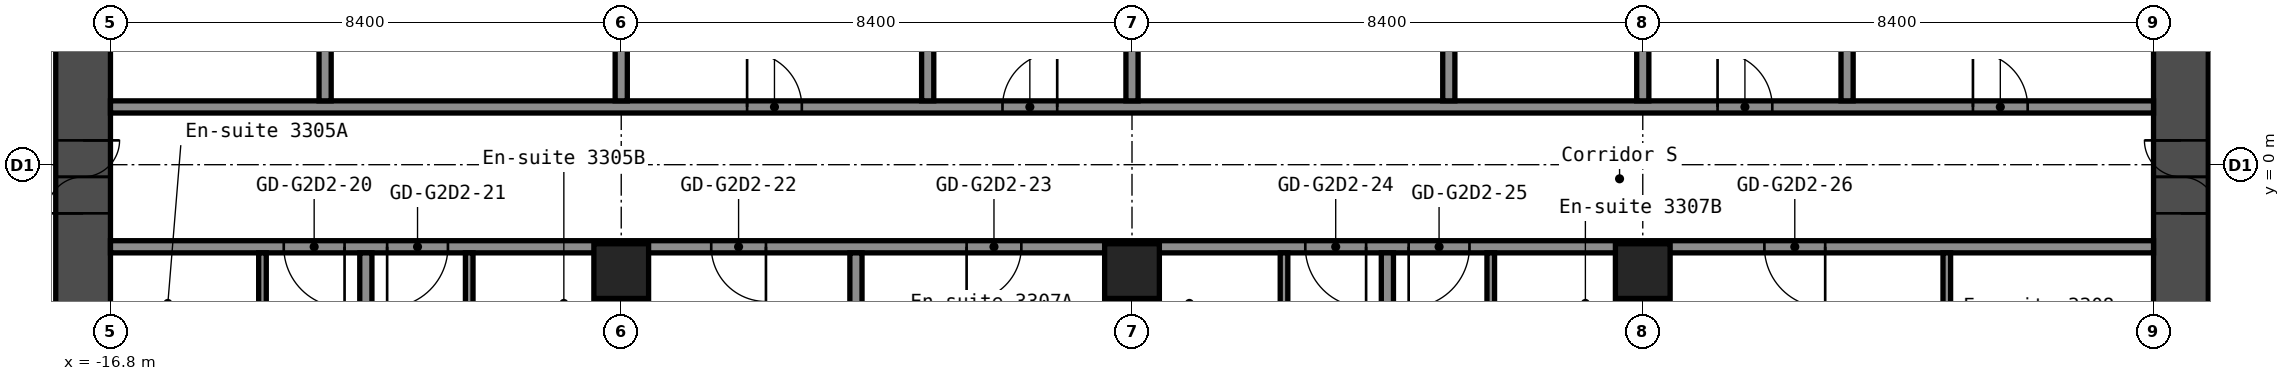
"""IFC4 building model, lengths in metres.
Left out: names, types, materials, properties, quantities, classifications, styles, units other than length and angle.
Written with IfcOpenShell. Run it as: python <this file> out.ifc"""

import sys

from ifc_helpers import new_model, si_unit, direction, frame, frame_2d, origin, origin_2d, place, context, subcontext, project, spatial, rectangle, hollow_rectangle, extrude, element, fill, save


model = new_model("IFC4")
c1 = context("Model", 3, precision=1e-05, world=origin(), true_north=direction((0.0, 1.0)))
c2 = subcontext(c1, "Body", "Model", "MODEL_VIEW")
j1 = project(units=[si_unit("LENGTHUNIT", "METRE"), si_unit("PLANEANGLEUNIT", "RADIAN")], contexts=[c1])
p1 = place(None, origin())
s1 = spatial("IfcSite", under=j1, at=p1, CompositionType="ELEMENT")
p2 = place(p1, origin())
s2 = spatial("IfcBuilding", under=s1, at=p2, CompositionType="ELEMENT")
p3 = place(p2, frame((0.0, 0.0, 117.0)))
s3 = spatial("IfcBuildingStorey", under=s2, at=p3, CompositionType="ELEMENT", Elevation=117.0)
for number, where, z_axis, x_axis in (
    (1, (-8.4, -1.75, 0.0), (0.0, 0.0, 1.0), (1.0, 0.0, 0.0)),
    (2, (0.0, -1.75, 0.0), (0.0, 0.0, 1.0), (1.0, 0.0, 0.0)),
    (3, (8.4, -1.75, 0.0), (0.0, 0.0, 1.0), (1.0, 0.0, 0.0)),
):
    element("IfcColumn", number, at=place(p3, frame(where, z_axis=z_axis, x_axis=x_axis)), inside=s3, PredefinedType="COLUMN", context=c2, shape_type="SweptSolid", body=[
        extrude(hollow_rectangle(XDim=0.9, YDim=0.9, WallThickness=0.036, at=origin_2d()), origin(), (0.0, 0.0, 1.0), 2.9),
    ])
p4 = place(p3, frame((-17.25, -8.4, 0.0), z_axis=(0.0, 0.0, 1.0), x_axis=(0.0, 1.0, 0.0)))
e4 = element("IfcWall", 4, at=p4, inside=s3, PredefinedType="SHEAR", context=c2, shape_type="SweptSolid", body=[
    extrude(rectangle(XDim=16.8, YDim=0.9, at=frame_2d((8.4, 0.0))), origin(), (0.0, 0.0, 1.0), 2.9),
])
p5 = place(p4, frame((7.6, 0.0, 0.0)))
e5 = element("IfcOpeningElement", 5, at=p5, cuts=e4, PredefinedType="OPENING", context=c2, shape_type="SweptSolid", body=[
    extrude(rectangle(XDim=1.2, YDim=2.1, at=frame_2d((0.6, 1.05))), frame((0.0, 0.46, 0.0), z_axis=(0.0, -1.0, 0.0), x_axis=(1.0, 0.0, 0.0)), (0.0, 0.0, 1.0), 0.92),
])
p6 = place(p3, frame((17.25, -8.4, 0.0), z_axis=(0.0, 0.0, 1.0), x_axis=(0.0, 1.0, 0.0)))
e6 = element("IfcWall", 6, at=p6, inside=s3, PredefinedType="SHEAR", context=c2, shape_type="SweptSolid", body=[
    extrude(rectangle(XDim=16.8, YDim=0.9, at=frame_2d((8.4, 0.0))), origin(), (0.0, 0.0, 1.0), 2.9),
])
p7 = place(p6, frame((7.6, 0.0, 0.0)))
e7 = element("IfcOpeningElement", 7, at=p7, cuts=e6, PredefinedType="OPENING", context=c2, shape_type="SweptSolid", body=[
    extrude(rectangle(XDim=1.2, YDim=2.1, at=frame_2d((0.6, 1.05))), frame((0.0, 0.46, 0.0), z_axis=(0.0, -1.0, 0.0), x_axis=(1.0, 0.0, 0.0)), (0.0, 0.0, 1.0), 0.92),
])
p8 = place(p3, frame((-16.8, -1.35, 0.0), z_axis=(0.0, 0.0, 1.0), x_axis=(1.0, 0.0, 0.0)))
e8 = element("IfcWall", 8, at=p8, inside=s3, PredefinedType="PARTITIONING", context=c2, shape_type="SweptSolid", body=[
    extrude(rectangle(XDim=33.6, YDim=0.2, at=frame_2d((16.8, 0.0))), origin(), (0.0, 0.0, 1.0), 2.9),
])
p9 = place(p8, frame((2.85, 0.0, 0.0)))
e9 = element("IfcOpeningElement", 9, at=p9, cuts=e8, PredefinedType="OPENING", context=c2, shape_type="SweptSolid", body=[
    extrude(rectangle(XDim=1.0, YDim=2.1, at=frame_2d((0.5, 1.05))), frame((0.0, 0.11, 0.0), z_axis=(0.0, -1.0, 0.0), x_axis=(1.0, 0.0, 0.0)), (0.0, 0.0, 1.0), 0.22),
])
p10 = place(p8, frame((4.55, 0.0, 0.0)))
e10 = element("IfcOpeningElement", 10, at=p10, cuts=e8, PredefinedType="OPENING", context=c2, shape_type="SweptSolid", body=[
    extrude(rectangle(XDim=1.0, YDim=2.1, at=frame_2d((0.5, 1.05))), frame((0.0, 0.11, 0.0), z_axis=(0.0, -1.0, 0.0), x_axis=(1.0, 0.0, 0.0)), (0.0, 0.0, 1.0), 0.22),
])
p11 = place(p8, frame((9.88, 0.0, 0.0)))
e11 = element("IfcOpeningElement", 11, at=p11, cuts=e8, PredefinedType="OPENING", context=c2, shape_type="SweptSolid", body=[
    extrude(rectangle(XDim=0.9, YDim=2.1, at=frame_2d((0.45, 1.05))), frame((0.0, 0.11, 0.0), z_axis=(0.0, -1.0, 0.0), x_axis=(1.0, 0.0, 0.0)), (0.0, 0.0, 1.0), 0.22),
])
p12 = place(p8, frame((14.08, 0.0, 0.0)))
e12 = element("IfcOpeningElement", 12, at=p12, cuts=e8, PredefinedType="OPENING", context=c2, shape_type="SweptSolid", body=[
    extrude(rectangle(XDim=0.9, YDim=2.1, at=frame_2d((0.45, 1.05))), frame((0.0, 0.11, 0.0), z_axis=(0.0, -1.0, 0.0), x_axis=(1.0, 0.0, 0.0)), (0.0, 0.0, 1.0), 0.22),
])
p13 = place(p8, frame((19.65, 0.0, 0.0)))
e13 = element("IfcOpeningElement", 13, at=p13, cuts=e8, PredefinedType="OPENING", context=c2, shape_type="SweptSolid", body=[
    extrude(rectangle(XDim=1.0, YDim=2.1, at=frame_2d((0.5, 1.05))), frame((0.0, 0.11, 0.0), z_axis=(0.0, -1.0, 0.0), x_axis=(1.0, 0.0, 0.0)), (0.0, 0.0, 1.0), 0.22),
])
p14 = place(p8, frame((21.35, 0.0, 0.0)))
e14 = element("IfcOpeningElement", 14, at=p14, cuts=e8, PredefinedType="OPENING", context=c2, shape_type="SweptSolid", body=[
    extrude(rectangle(XDim=1.0, YDim=2.1, at=frame_2d((0.5, 1.05))), frame((0.0, 0.11, 0.0), z_axis=(0.0, -1.0, 0.0), x_axis=(1.0, 0.0, 0.0)), (0.0, 0.0, 1.0), 0.22),
])
p15 = place(p8, frame((27.2, 0.0, 0.0)))
e15 = element("IfcOpeningElement", 15, at=p15, cuts=e8, PredefinedType="OPENING", context=c2, shape_type="SweptSolid", body=[
    extrude(rectangle(XDim=1.0, YDim=2.1, at=frame_2d((0.5, 1.05))), frame((0.0, 0.11, 0.0), z_axis=(0.0, -1.0, 0.0), x_axis=(1.0, 0.0, 0.0)), (0.0, 0.0, 1.0), 0.22),
])
p16 = place(p3, frame((-16.8, 0.95, 0.0), z_axis=(0.0, 0.0, 1.0), x_axis=(1.0, 0.0, 0.0)))
e16 = element("IfcWall", 16, at=p16, inside=s3, PredefinedType="PARTITIONING", context=c2, shape_type="SweptSolid", body=[
    extrude(rectangle(XDim=33.6, YDim=0.2, at=frame_2d((16.8, 0.0))), origin(), (0.0, 0.0, 1.0), 2.9),
])
p17 = place(p16, frame((10.47, 0.0, 0.0)))
e17 = element("IfcOpeningElement", 17, at=p17, cuts=e16, PredefinedType="OPENING", context=c2, shape_type="SweptSolid", body=[
    extrude(rectangle(XDim=0.9, YDim=2.1, at=frame_2d((0.45, 1.05))), frame((0.0, 0.11, 0.0), z_axis=(0.0, -1.0, 0.0), x_axis=(1.0, 0.0, 0.0)), (0.0, 0.0, 1.0), 0.22),
])
p18 = place(p16, frame((14.67, 0.0, 0.0)))
e18 = element("IfcOpeningElement", 18, at=p18, cuts=e16, PredefinedType="OPENING", context=c2, shape_type="SweptSolid", body=[
    extrude(rectangle(XDim=0.9, YDim=2.1, at=frame_2d((0.45, 1.05))), frame((0.0, 0.11, 0.0), z_axis=(0.0, -1.0, 0.0), x_axis=(1.0, 0.0, 0.0)), (0.0, 0.0, 1.0), 0.22),
])
p19 = place(p16, frame((26.43, 0.0, 0.0)))
e19 = element("IfcOpeningElement", 19, at=p19, cuts=e16, PredefinedType="OPENING", context=c2, shape_type="SweptSolid", body=[
    extrude(rectangle(XDim=0.9, YDim=2.1, at=frame_2d((0.45, 1.05))), frame((0.0, 0.11, 0.0), z_axis=(0.0, -1.0, 0.0), x_axis=(1.0, 0.0, 0.0)), (0.0, 0.0, 1.0), 0.22),
])
p20 = place(p16, frame((30.63, 0.0, 0.0)))
e20 = element("IfcOpeningElement", 20, at=p20, cuts=e16, PredefinedType="OPENING", context=c2, shape_type="SweptSolid", body=[
    extrude(rectangle(XDim=0.9, YDim=2.1, at=frame_2d((0.45, 1.05))), frame((0.0, 0.11, 0.0), z_axis=(0.0, -1.0, 0.0), x_axis=(1.0, 0.0, 0.0)), (0.0, 0.0, 1.0), 0.22),
])
p21 = place(p3, frame((-14.3, -4.35, 0.0), z_axis=(0.0, 0.0, 1.0), x_axis=(0.0, 1.0, 0.0)))
e21 = element("IfcWall", 21, at=p21, inside=s3, PredefinedType="PARTITIONING", context=c2, shape_type="SweptSolid", body=[
    extrude(rectangle(XDim=2.9, YDim=0.125, at=frame_2d((1.45, 0.0))), origin(), (0.0, 0.0, 1.0), 2.9),
])
p22 = place(p21, frame((0.6, 0.0, 0.0)))
e22 = element("IfcOpeningElement", 22, at=p22, cuts=e21, PredefinedType="OPENING", context=c2, shape_type="SweptSolid", body=[
    extrude(rectangle(XDim=0.8, YDim=2.1, at=frame_2d((0.4, 1.05))), frame((0.0, 0.073, 0.0), z_axis=(0.0, -1.0, 0.0), x_axis=(1.0, 0.0, 0.0)), (0.0, 0.0, 1.0), 0.145),
])
p23 = place(p3, frame((-13.27, 1.05, 0.0), z_axis=(0.0, 0.0, 1.0), x_axis=(0.0, 1.0, 0.0)))
e23 = element("IfcWall", 23, at=p23, inside=s3, PredefinedType="PARTITIONING", context=c2, shape_type="SweptSolid", body=[
    extrude(rectangle(XDim=5.9, YDim=0.2, at=frame_2d((2.95, 0.0))), origin(), (0.0, 0.0, 1.0), 2.9),
])
p24 = place(p3, frame((-12.6, -15.55, 0.0), z_axis=(0.0, 0.0, 1.0), x_axis=(0.0, 1.0, 0.0)))
e24 = element("IfcWall", 24, at=p24, inside=s3, PredefinedType="PARTITIONING", context=c2, shape_type="SweptSolid", body=[
    extrude(rectangle(XDim=14.1, YDim=0.2, at=frame_2d((7.05, 0.0))), origin(), (0.0, 0.0, 1.0), 2.9),
])
p25 = place(p3, frame((-10.9, -4.35, 0.0), z_axis=(0.0, 0.0, 1.0), x_axis=(0.0, 1.0, 0.0)))
e25 = element("IfcWall", 25, at=p25, inside=s3, PredefinedType="PARTITIONING", context=c2, shape_type="SweptSolid", body=[
    extrude(rectangle(XDim=2.9, YDim=0.125, at=frame_2d((1.45, 0.0))), origin(), (0.0, 0.0, 1.0), 2.9),
])
p26 = place(p25, frame((0.6, 0.0, 0.0)))
e26 = element("IfcOpeningElement", 26, at=p26, cuts=e25, PredefinedType="OPENING", context=c2, shape_type="SweptSolid", body=[
    extrude(rectangle(XDim=0.8, YDim=2.1, at=frame_2d((0.4, 1.05))), frame((0.0, 0.073, 0.0), z_axis=(0.0, -1.0, 0.0), x_axis=(1.0, 0.0, 0.0)), (0.0, 0.0, 1.0), 0.145),
])
p27 = place(p3, frame((-8.4, -15.55, 0.0), z_axis=(0.0, 0.0, 1.0), x_axis=(0.0, 1.0, 0.0)))
e27 = element("IfcWall", 27, at=p27, inside=s3, PredefinedType="PARTITIONING", context=c2, shape_type="SweptSolid", body=[
    extrude(rectangle(XDim=13.36, YDim=0.2, at=frame_2d((6.68, 0.0))), origin(), (0.0, 0.0, 1.0), 2.9),
])
p28 = place(p3, frame((-8.4, 1.05, 0.0), z_axis=(0.0, 0.0, 1.0), x_axis=(0.0, 1.0, 0.0)))
e28 = element("IfcWall", 28, at=p28, inside=s3, PredefinedType="PARTITIONING", context=c2, shape_type="SweptSolid", body=[
    extrude(rectangle(XDim=5.9, YDim=0.2, at=frame_2d((2.95, 0.0))), origin(), (0.0, 0.0, 1.0), 2.9),
])
p29 = place(p3, frame((-4.54, -15.55, 0.0), z_axis=(0.0, 0.0, 1.0), x_axis=(0.0, 1.0, 0.0)))
e29 = element("IfcWall", 29, at=p29, inside=s3, PredefinedType="PARTITIONING", context=c2, shape_type="SweptSolid", body=[
    extrude(rectangle(XDim=14.1, YDim=0.2, at=frame_2d((7.05, 0.0))), origin(), (0.0, 0.0, 1.0), 2.9),
])
p30 = place(p3, frame((-3.36, 1.05, 0.0), z_axis=(0.0, 0.0, 1.0), x_axis=(0.0, 1.0, 0.0)))
e30 = element("IfcWall", 30, at=p30, inside=s3, PredefinedType="PARTITIONING", context=c2, shape_type="SweptSolid", body=[
    extrude(rectangle(XDim=5.9, YDim=0.2, at=frame_2d((2.95, 0.0))), origin(), (0.0, 0.0, 1.0), 2.9),
])
p31 = place(p3, frame((0.0, -15.55, 0.0), z_axis=(0.0, 0.0, 1.0), x_axis=(0.0, 1.0, 0.0)))
e31 = element("IfcWall", 31, at=p31, inside=s3, PredefinedType="PARTITIONING", context=c2, shape_type="SweptSolid", body=[
    extrude(rectangle(XDim=13.36, YDim=0.2, at=frame_2d((6.68, 0.0))), origin(), (0.0, 0.0, 1.0), 2.9),
])
p32 = place(p3, frame((0.0, 1.05, 0.0), z_axis=(0.0, 0.0, 1.0), x_axis=(0.0, 1.0, 0.0)))
e32 = element("IfcWall", 32, at=p32, inside=s3, PredefinedType="PARTITIONING", context=c2, shape_type="SweptSolid", body=[
    extrude(rectangle(XDim=5.9, YDim=0.2, at=frame_2d((2.95, 0.0))), origin(), (0.0, 0.0, 1.0), 2.9),
])
p33 = place(p3, frame((2.5, -4.35, 0.0), z_axis=(0.0, 0.0, 1.0), x_axis=(0.0, 1.0, 0.0)))
e33 = element("IfcWall", 33, at=p33, inside=s3, PredefinedType="PARTITIONING", context=c2, shape_type="SweptSolid", body=[
    extrude(rectangle(XDim=2.9, YDim=0.125, at=frame_2d((1.45, 0.0))), origin(), (0.0, 0.0, 1.0), 2.9),
])
p34 = place(p33, frame((0.6, 0.0, 0.0)))
e34 = element("IfcOpeningElement", 34, at=p34, cuts=e33, PredefinedType="OPENING", context=c2, shape_type="SweptSolid", body=[
    extrude(rectangle(XDim=0.8, YDim=2.1, at=frame_2d((0.4, 1.05))), frame((0.0, 0.073, 0.0), z_axis=(0.0, -1.0, 0.0), x_axis=(1.0, 0.0, 0.0)), (0.0, 0.0, 1.0), 0.145),
])
p35 = place(p3, frame((4.2, -15.55, 0.0), z_axis=(0.0, 0.0, 1.0), x_axis=(0.0, 1.0, 0.0)))
e35 = element("IfcWall", 35, at=p35, inside=s3, PredefinedType="PARTITIONING", context=c2, shape_type="SweptSolid", body=[
    extrude(rectangle(XDim=14.1, YDim=0.2, at=frame_2d((7.05, 0.0))), origin(), (0.0, 0.0, 1.0), 2.9),
])
p36 = place(p3, frame((5.21, 1.05, 0.0), z_axis=(0.0, 0.0, 1.0), x_axis=(0.0, 1.0, 0.0)))
e36 = element("IfcWall", 36, at=p36, inside=s3, PredefinedType="PARTITIONING", context=c2, shape_type="SweptSolid", body=[
    extrude(rectangle(XDim=5.9, YDim=0.2, at=frame_2d((2.95, 0.0))), origin(), (0.0, 0.0, 1.0), 2.9),
])
p37 = place(p3, frame((5.9, -4.35, 0.0), z_axis=(0.0, 0.0, 1.0), x_axis=(0.0, 1.0, 0.0)))
e37 = element("IfcWall", 37, at=p37, inside=s3, PredefinedType="PARTITIONING", context=c2, shape_type="SweptSolid", body=[
    extrude(rectangle(XDim=2.9, YDim=0.125, at=frame_2d((1.45, 0.0))), origin(), (0.0, 0.0, 1.0), 2.9),
])
p38 = place(p37, frame((0.6, 0.0, 0.0)))
e38 = element("IfcOpeningElement", 38, at=p38, cuts=e37, PredefinedType="OPENING", context=c2, shape_type="SweptSolid", body=[
    extrude(rectangle(XDim=0.8, YDim=2.1, at=frame_2d((0.4, 1.05))), frame((0.0, 0.073, 0.0), z_axis=(0.0, -1.0, 0.0), x_axis=(1.0, 0.0, 0.0)), (0.0, 0.0, 1.0), 0.145),
])
p39 = place(p3, frame((8.4, -15.55, 0.0), z_axis=(0.0, 0.0, 1.0), x_axis=(0.0, 1.0, 0.0)))
e39 = element("IfcWall", 39, at=p39, inside=s3, PredefinedType="PARTITIONING", context=c2, shape_type="SweptSolid", body=[
    extrude(rectangle(XDim=13.36, YDim=0.2, at=frame_2d((6.68, 0.0))), origin(), (0.0, 0.0, 1.0), 2.9),
])
for number, where, z_axis, x_axis in (
    (40, (8.4, 1.05, 0.0), (0.0, 0.0, 1.0), (0.0, 1.0, 0.0)),
    (41, (11.76, 1.05, 0.0), (0.0, 0.0, 1.0), (0.0, 1.0, 0.0)),
):
    element("IfcWall", number, at=place(p3, frame(where, z_axis=z_axis, x_axis=x_axis)), inside=s3, PredefinedType="PARTITIONING", context=c2, shape_type="SweptSolid", body=[
        extrude(rectangle(XDim=5.9, YDim=0.2, at=frame_2d((2.95, 0.0))), origin(), (0.0, 0.0, 1.0), 2.9),
    ])
p40 = place(p3, frame((13.4, -4.75, 0.0), z_axis=(0.0, 0.0, 1.0), x_axis=(0.0, 1.0, 0.0)))
e42 = element("IfcWall", 42, at=p40, inside=s3, PredefinedType="PARTITIONING", context=c2, shape_type="SweptSolid", body=[
    extrude(rectangle(XDim=3.3, YDim=0.125, at=frame_2d((1.65, 0.0))), origin(), (0.0, 0.0, 1.0), 2.9),
])
p41 = place(p5, origin())
e43 = element("IfcDoor", 43, at=p41, inside=s3, OperationType="DOUBLE_DOOR_SINGLE_SWING", PredefinedType="DOOR", context=c2, shape_type="SweptSolid", body=[
    extrude(rectangle(XDim=1.2, YDim=2.1, at=frame_2d((0.6, 1.05))), frame((0.0, 0.025, 0.0), z_axis=(0.0, -1.0, 0.0), x_axis=(1.0, 0.0, 0.0)), (0.0, 0.0, 1.0), 0.05),
])
fill(e5, e43)
p42 = place(p7, origin())
e44 = element("IfcDoor", 44, at=p42, inside=s3, OperationType="DOUBLE_DOOR_SINGLE_SWING", PredefinedType="DOOR", context=c2, shape_type="SweptSolid", body=[
    extrude(rectangle(XDim=1.2, YDim=2.1, at=frame_2d((0.6, 1.05))), frame((0.0, 0.025, 0.0), z_axis=(0.0, -1.0, 0.0), x_axis=(1.0, 0.0, 0.0)), (0.0, 0.0, 1.0), 0.05),
])
fill(e7, e44)
p43 = place(p9, origin())
e45 = element("IfcDoor", 45, at=p43, inside=s3, OperationType="SINGLE_SWING_RIGHT", PredefinedType="DOOR", context=c2, shape_type="SweptSolid", body=[
    extrude(rectangle(XDim=1.0, YDim=2.1, at=frame_2d((0.5, 1.05))), frame((0.0, 0.025, 0.0), z_axis=(0.0, -1.0, 0.0), x_axis=(1.0, 0.0, 0.0)), (0.0, 0.0, 1.0), 0.05),
])
fill(e9, e45)
p44 = place(p10, origin())
e46 = element("IfcDoor", 46, at=p44, inside=s3, OperationType="SINGLE_SWING_LEFT", PredefinedType="DOOR", context=c2, shape_type="SweptSolid", body=[
    extrude(rectangle(XDim=1.0, YDim=2.1, at=frame_2d((0.5, 1.05))), frame((0.0, 0.025, 0.0), z_axis=(0.0, -1.0, 0.0), x_axis=(1.0, 0.0, 0.0)), (0.0, 0.0, 1.0), 0.05),
])
fill(e10, e46)
p45 = place(p11, origin())
e47 = element("IfcDoor", 47, at=p45, inside=s3, OperationType="SINGLE_SWING_RIGHT", PredefinedType="DOOR", context=c2, shape_type="SweptSolid", body=[
    extrude(rectangle(XDim=0.9, YDim=2.1, at=frame_2d((0.45, 1.05))), frame((0.0, 0.025, 0.0), z_axis=(0.0, -1.0, 0.0), x_axis=(1.0, 0.0, 0.0)), (0.0, 0.0, 1.0), 0.05),
])
fill(e11, e47)
p46 = place(p12, origin())
e48 = element("IfcDoor", 48, at=p46, inside=s3, OperationType="SINGLE_SWING_LEFT", PredefinedType="DOOR", context=c2, shape_type="SweptSolid", body=[
    extrude(rectangle(XDim=0.9, YDim=2.1, at=frame_2d((0.45, 1.05))), frame((0.0, 0.025, 0.0), z_axis=(0.0, -1.0, 0.0), x_axis=(1.0, 0.0, 0.0)), (0.0, 0.0, 1.0), 0.05),
])
fill(e12, e48)
p47 = place(p13, origin())
e49 = element("IfcDoor", 49, at=p47, inside=s3, OperationType="SINGLE_SWING_RIGHT", PredefinedType="DOOR", context=c2, shape_type="SweptSolid", body=[
    extrude(rectangle(XDim=1.0, YDim=2.1, at=frame_2d((0.5, 1.05))), frame((0.0, 0.025, 0.0), z_axis=(0.0, -1.0, 0.0), x_axis=(1.0, 0.0, 0.0)), (0.0, 0.0, 1.0), 0.05),
])
fill(e13, e49)
p48 = place(p14, origin())
e50 = element("IfcDoor", 50, at=p48, inside=s3, OperationType="SINGLE_SWING_LEFT", PredefinedType="DOOR", context=c2, shape_type="SweptSolid", body=[
    extrude(rectangle(XDim=1.0, YDim=2.1, at=frame_2d((0.5, 1.05))), frame((0.0, 0.025, 0.0), z_axis=(0.0, -1.0, 0.0), x_axis=(1.0, 0.0, 0.0)), (0.0, 0.0, 1.0), 0.05),
])
fill(e14, e50)
p49 = place(p15, origin())
e51 = element("IfcDoor", 51, at=p49, inside=s3, OperationType="SINGLE_SWING_RIGHT", PredefinedType="DOOR", context=c2, shape_type="SweptSolid", body=[
    extrude(rectangle(XDim=1.0, YDim=2.1, at=frame_2d((0.5, 1.05))), frame((0.0, 0.025, 0.0), z_axis=(0.0, -1.0, 0.0), x_axis=(1.0, 0.0, 0.0)), (0.0, 0.0, 1.0), 0.05),
])
fill(e15, e51)
p50 = place(p17, origin())
e52 = element("IfcDoor", 52, at=p50, inside=s3, OperationType="SINGLE_SWING_RIGHT", PredefinedType="DOOR", context=c2, shape_type="SweptSolid", body=[
    extrude(rectangle(XDim=0.9, YDim=2.1, at=frame_2d((0.45, 1.05))), frame((0.0, 0.025, 0.0), z_axis=(0.0, -1.0, 0.0), x_axis=(1.0, 0.0, 0.0)), (0.0, 0.0, 1.0), 0.05),
])
fill(e17, e52)
p51 = place(p18, origin())
e53 = element("IfcDoor", 53, at=p51, inside=s3, OperationType="SINGLE_SWING_LEFT", PredefinedType="DOOR", context=c2, shape_type="SweptSolid", body=[
    extrude(rectangle(XDim=0.9, YDim=2.1, at=frame_2d((0.45, 1.05))), frame((0.0, 0.025, 0.0), z_axis=(0.0, -1.0, 0.0), x_axis=(1.0, 0.0, 0.0)), (0.0, 0.0, 1.0), 0.05),
])
fill(e18, e53)
p52 = place(p19, origin())
e54 = element("IfcDoor", 54, at=p52, inside=s3, OperationType="SINGLE_SWING_RIGHT", PredefinedType="DOOR", context=c2, shape_type="SweptSolid", body=[
    extrude(rectangle(XDim=0.9, YDim=2.1, at=frame_2d((0.45, 1.05))), frame((0.0, 0.025, 0.0), z_axis=(0.0, -1.0, 0.0), x_axis=(1.0, 0.0, 0.0)), (0.0, 0.0, 1.0), 0.05),
])
fill(e19, e54)
p53 = place(p20, origin())
e55 = element("IfcDoor", 55, at=p53, inside=s3, OperationType="SINGLE_SWING_RIGHT", PredefinedType="DOOR", context=c2, shape_type="SweptSolid", body=[
    extrude(rectangle(XDim=0.9, YDim=2.1, at=frame_2d((0.45, 1.05))), frame((0.0, 0.025, 0.0), z_axis=(0.0, -1.0, 0.0), x_axis=(1.0, 0.0, 0.0)), (0.0, 0.0, 1.0), 0.05),
])
fill(e20, e55)
save(model, sys.argv[1])
